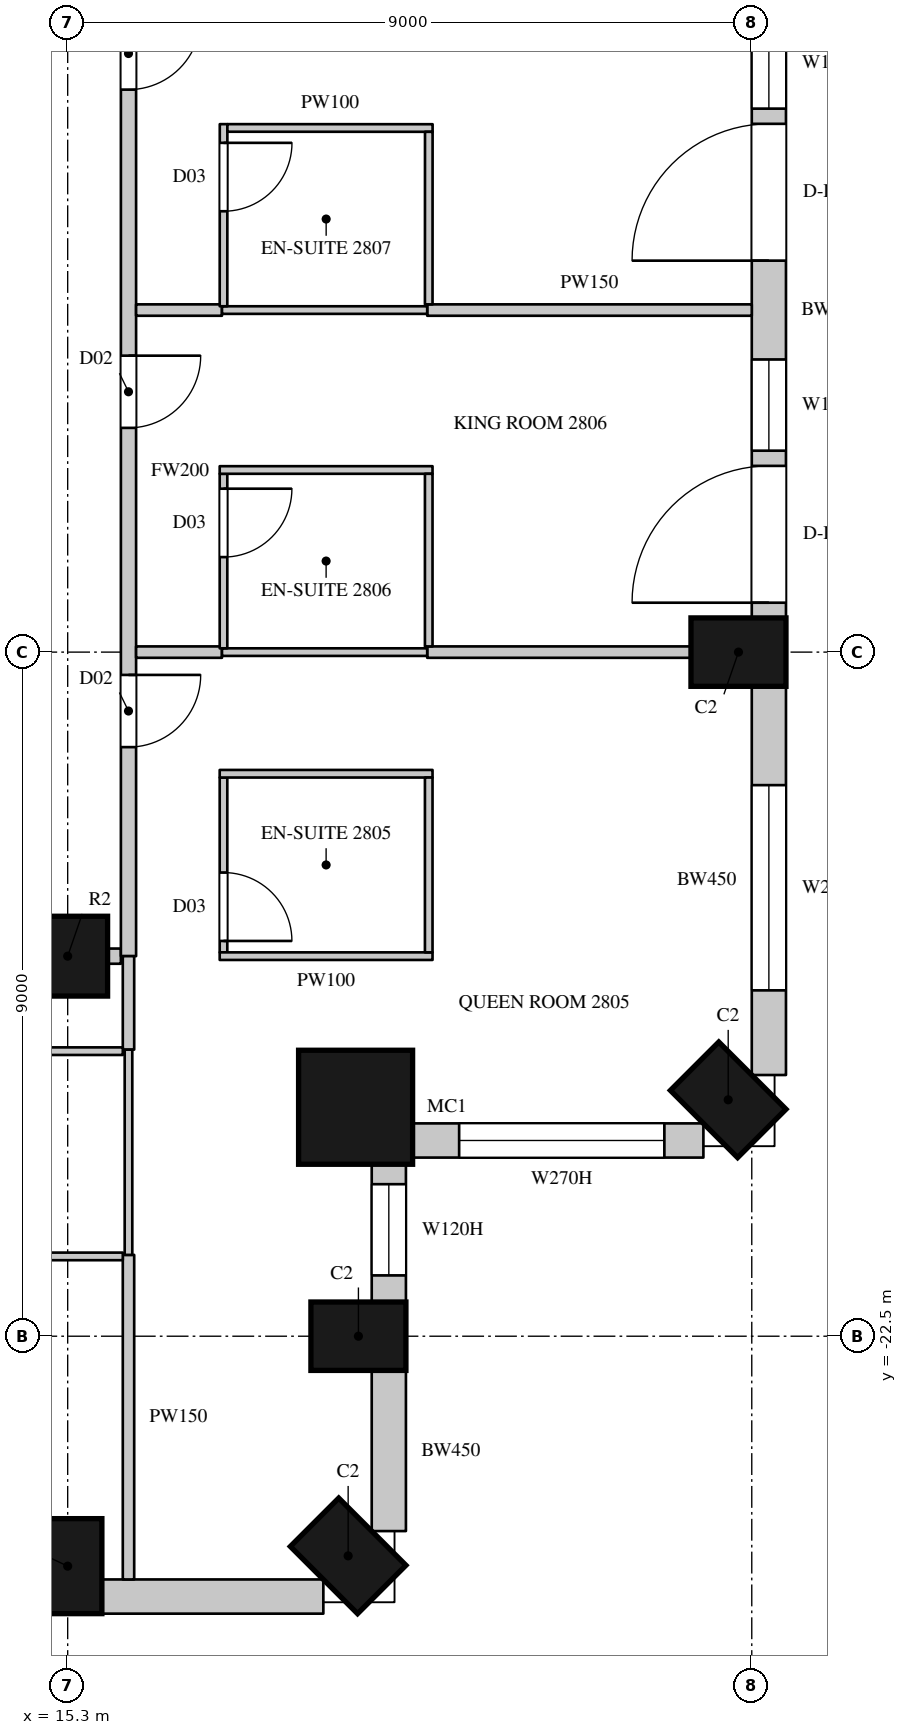
"""IFC4 building model, lengths in metres.
Left out: names, types, materials, properties, quantities, classifications, styles, units other than length and angle.
Written with IfcOpenShell. Run it as: python <this file> out.ifc"""

import sys

from ifc_helpers import new_model, si_unit, direction, frame, frame_2d, origin, origin_2d, place, context, subcontext, project, spatial, rectangle, circle, extrude, element, fill, save


model = new_model("IFC4")
c1 = context("Model", 3, precision=1e-05, world=origin(), true_north=direction((0.0, 1.0)))
c2 = subcontext(c1, "Body", "Model", "MODEL_VIEW")
j1 = project(units=[si_unit("LENGTHUNIT", "METRE"), si_unit("PLANEANGLEUNIT", "RADIAN")], contexts=[c1])
p1 = place(None, origin())
s1 = spatial("IfcSite", under=j1, at=p1, CompositionType="ELEMENT")
p2 = place(p1, origin())
s2 = spatial("IfcBuilding", under=s1, at=p2, CompositionType="ELEMENT")
p3 = place(p2, frame((0.0, 0.0, 131.1)))
s3 = spatial("IfcBuildingStorey", under=s2, at=p3, CompositionType="ELEMENT", Elevation=131.1)
for number, where, z_axis, x_axis in (
    (1, (15.3, -25.525, 0.0), (0.0, 0.0, 1.0), (1.0, 0.0, 0.0)),
    (2, (18.99, -25.39, 0.0), (0.0, 0.0, 1.0), (0.707, 0.707, 0.0)),
    (3, (19.125, -22.5, 0.0), (0.0, 0.0, 1.0), (0.0, 1.0, 0.0)),
):
    element("IfcColumn", number, at=place(p3, frame(where, z_axis=z_axis, x_axis=x_axis)), inside=s3, PredefinedType="COLUMN", context=c2, shape_type="SweptSolid", body=[
        extrude(rectangle(XDim=0.9, YDim=1.25, at=origin_2d()), origin(), (0.0, 0.0, 1.0), 3.6),
    ])
p4 = place(p3, frame((19.088, -19.488, 0.0), z_axis=(0.0, 0.0, 1.0), x_axis=(1.0, 0.0, 0.0)))
e4 = element("IfcColumn", 4, at=p4, inside=s3, PredefinedType="COLUMN", context=c2, shape_type="SweptSolid", body=[
    extrude(circle(Radius=0.75, at=origin_2d()), origin(), (0.0, 0.0, 1.0), 3.6),
])
for number, where, z_axis, x_axis in (
    (5, (23.99, -19.39, 0.0), (0.0, 0.0, 1.0), (0.707, 0.707, 0.0)),
    (6, (24.125, -13.5, 0.0), (0.0, 0.0, 1.0), (0.0, 1.0, 0.0)),
):
    element("IfcColumn", number, at=place(p3, frame(where, z_axis=z_axis, x_axis=x_axis)), inside=s3, PredefinedType="COLUMN", context=c2, shape_type="SweptSolid", body=[
        extrude(rectangle(XDim=0.9, YDim=1.25, at=origin_2d()), origin(), (0.0, 0.0, 1.0), 3.6),
    ])
p5 = place(p3, frame((15.3, -17.5, 0.0), z_axis=(0.0, 0.0, 1.0), x_axis=(1.0, 0.0, 0.0)))
e7 = element("IfcColumn", 7, at=p5, inside=s3, PredefinedType="COLUMN", context=c2, shape_type="SweptSolid", body=[
    extrude(circle(Radius=0.525, at=origin_2d()), origin(), (0.0, 0.0, 1.0), 3.6),
])
p6 = place(p3, frame((15.75, -25.925, 0.0), z_axis=(0.0, 0.0, 1.0), x_axis=(1.0, 0.0, 0.0)))
e8 = element("IfcWall", 8, at=p6, inside=s3, PredefinedType="SOLIDWALL", context=c2, shape_type="SweptSolid", body=[
    extrude(rectangle(XDim=2.914, YDim=0.45, at=frame_2d((1.457, 0.0))), origin(), (0.0, 0.0, 1.0), 3.3),
])
p7 = place(p3, frame((19.525, -25.064, 0.0), z_axis=(0.0, 0.0, 1.0), x_axis=(0.0, 1.0, 0.0)))
e9 = element("IfcWall", 9, at=p7, inside=s3, PredefinedType="SOLIDWALL", context=c2, shape_type="SweptSolid", body=[
    extrude(rectangle(XDim=2.114, YDim=0.45, at=frame_2d((1.057, 0.0))), origin(), (0.0, 0.0, 1.0), 3.3),
])
p8 = place(p3, frame((19.525, -22.05, 0.0), z_axis=(0.0, 0.0, 1.0), x_axis=(0.0, 1.0, 0.0)))
e10 = element("IfcWall", 10, at=p8, inside=s3, PredefinedType="SOLIDWALL", context=c2, shape_type="SweptSolid", body=[
    extrude(rectangle(XDim=1.843, YDim=0.45, at=frame_2d((0.921, 0.0))), origin(), (0.0, 0.0, 1.0), 3.3),
])
p9 = place(p8, frame((0.35, 0.0, 1.05)))
e11 = element("IfcOpeningElement", 11, at=p9, cuts=e10, PredefinedType="OPENING", context=c2, shape_type="SweptSolid", body=[
    extrude(rectangle(XDim=1.2, YDim=2.0, at=frame_2d((0.6, 1.0))), frame((0.0, 0.235, 0.0), z_axis=(0.0, -1.0, 0.0), x_axis=(1.0, 0.0, 0.0)), (0.0, 0.0, 1.0), 0.47),
])
p10 = place(p3, frame((19.807, -19.925, 0.0), z_axis=(0.0, 0.0, 1.0), x_axis=(1.0, 0.0, 0.0)))
e12 = element("IfcWall", 12, at=p10, inside=s3, PredefinedType="SOLIDWALL", context=c2, shape_type="SweptSolid", body=[
    extrude(rectangle(XDim=3.857, YDim=0.45, at=frame_2d((1.928, 0.0))), origin(), (0.0, 0.0, 1.0), 3.3),
])
p11 = place(p10, frame((0.643, 0.0, 1.05)))
e13 = element("IfcOpeningElement", 13, at=p11, cuts=e12, PredefinedType="OPENING", context=c2, shape_type="SweptSolid", body=[
    extrude(rectangle(XDim=2.7, YDim=2.0, at=frame_2d((1.35, 1.0))), frame((0.0, 0.235, 0.0), z_axis=(0.0, -1.0, 0.0), x_axis=(1.0, 0.0, 0.0)), (0.0, 0.0, 1.0), 0.47),
])
p12 = place(p3, frame((24.525, -19.064, 0.0), z_axis=(0.0, 0.0, 1.0), x_axis=(0.0, 1.0, 0.0)))
e14 = element("IfcWall", 14, at=p12, inside=s3, PredefinedType="SOLIDWALL", context=c2, shape_type="SweptSolid", body=[
    extrude(rectangle(XDim=5.114, YDim=0.45, at=frame_2d((2.557, 0.0))), origin(), (0.0, 0.0, 1.0), 3.3),
])
p13 = place(p12, frame((1.114, 0.0, 1.05)))
e15 = element("IfcOpeningElement", 15, at=p13, cuts=e14, PredefinedType="OPENING", context=c2, shape_type="SweptSolid", body=[
    extrude(rectangle(XDim=2.7, YDim=2.0, at=frame_2d((1.35, 1.0))), frame((0.0, 0.235, 0.0), z_axis=(0.0, -1.0, 0.0), x_axis=(1.0, 0.0, 0.0)), (0.0, 0.0, 1.0), 0.47),
])
p14 = place(p3, frame((24.525, -13.05, 0.0), z_axis=(0.0, 0.0, 1.0), x_axis=(0.0, 1.0, 0.0)))
e16 = element("IfcWall", 16, at=p14, inside=s3, PredefinedType="SOLIDWALL", context=c2, shape_type="SweptSolid", body=[
    extrude(rectangle(XDim=8.1, YDim=0.45, at=frame_2d((4.05, 0.0))), origin(), (0.0, 0.0, 1.0), 3.3),
])
p15 = place(p14, frame((0.2, 0.0, 0.0)))
e17 = element("IfcOpeningElement", 17, at=p15, cuts=e16, PredefinedType="OPENING", context=c2, shape_type="SweptSolid", body=[
    extrude(rectangle(XDim=1.8, YDim=2.4, at=frame_2d((0.9, 1.2))), frame((0.0, 0.235, 0.0), z_axis=(0.0, -1.0, 0.0), x_axis=(1.0, 0.0, 0.0)), (0.0, 0.0, 1.0), 0.47),
])
p16 = place(p14, frame((2.2, 0.0, 1.05)))
e18 = element("IfcOpeningElement", 18, at=p16, cuts=e16, PredefinedType="OPENING", context=c2, shape_type="SweptSolid", body=[
    extrude(rectangle(XDim=1.2, YDim=2.0, at=frame_2d((0.6, 1.0))), frame((0.0, 0.235, 0.0), z_axis=(0.0, -1.0, 0.0), x_axis=(1.0, 0.0, 0.0)), (0.0, 0.0, 1.0), 0.47),
])
p17 = place(p14, frame((4.7, 0.0, 0.0)))
e19 = element("IfcOpeningElement", 19, at=p17, cuts=e16, PredefinedType="OPENING", context=c2, shape_type="SweptSolid", body=[
    extrude(rectangle(XDim=1.8, YDim=2.4, at=frame_2d((0.9, 1.2))), frame((0.0, 0.235, 0.0), z_axis=(0.0, -1.0, 0.0), x_axis=(1.0, 0.0, 0.0)), (0.0, 0.0, 1.0), 0.47),
])
p18 = place(p14, frame((6.7, 0.0, 1.05)))
e20 = element("IfcOpeningElement", 20, at=p18, cuts=e16, PredefinedType="OPENING", context=c2, shape_type="SweptSolid", body=[
    extrude(rectangle(XDim=1.2, YDim=2.0, at=frame_2d((0.6, 1.0))), frame((0.0, 0.235, 0.0), z_axis=(0.0, -1.0, 0.0), x_axis=(1.0, 0.0, 0.0)), (0.0, 0.0, 1.0), 0.47),
])
p19 = place(p3, frame((15.825, -17.5, 0.0), z_axis=(0.0, 0.0, 1.0), x_axis=(1.0, 0.0, 0.0)))
e21 = element("IfcWall", 21, at=p19, inside=s3, PredefinedType="PARTITIONING", context=c2, shape_type="SweptSolid", body=[
    extrude(rectangle(XDim=0.175, YDim=0.2, at=frame_2d((0.087, 0.0))), origin(), (0.0, 0.0, 1.0), 3.3),
])
p20 = place(p3, frame((16.1, -17.5, 0.0), z_axis=(0.0, 0.0, 1.0), x_axis=(0.0, 1.0, 0.0)))
e22 = element("IfcWall", 22, at=p20, inside=s3, PredefinedType="PARTITIONING", context=c2, shape_type="SweptSolid", body=[
    extrude(rectangle(XDim=12.75, YDim=0.2, at=frame_2d((6.375, 0.0))), origin(), (0.0, 0.0, 1.0), 3.3),
])
p21 = place(p20, frame((2.75, 0.0, 0.0)))
e23 = element("IfcOpeningElement", 23, at=p21, cuts=e22, PredefinedType="OPENING", context=c2, shape_type="SweptSolid", body=[
    extrude(rectangle(XDim=0.95, YDim=2.2, at=frame_2d((0.475, 1.1))), frame((0.0, 0.11, 0.0), z_axis=(0.0, -1.0, 0.0), x_axis=(1.0, 0.0, 0.0)), (0.0, 0.0, 1.0), 0.22),
])
p22 = place(p20, frame((6.95, 0.0, 0.0)))
e24 = element("IfcOpeningElement", 24, at=p22, cuts=e22, PredefinedType="OPENING", context=c2, shape_type="SweptSolid", body=[
    extrude(rectangle(XDim=0.95, YDim=2.2, at=frame_2d((0.475, 1.1))), frame((0.0, 0.11, 0.0), z_axis=(0.0, -1.0, 0.0), x_axis=(1.0, 0.0, 0.0)), (0.0, 0.0, 1.0), 0.22),
])
p23 = place(p20, frame((11.4, 0.0, 0.0)))
e25 = element("IfcOpeningElement", 25, at=p23, cuts=e22, PredefinedType="OPENING", context=c2, shape_type="SweptSolid", body=[
    extrude(rectangle(XDim=0.95, YDim=2.2, at=frame_2d((0.475, 1.1))), frame((0.0, 0.11, 0.0), z_axis=(0.0, -1.0, 0.0), x_axis=(1.0, 0.0, 0.0)), (0.0, 0.0, 1.0), 0.22),
])
p24 = place(p3, frame((16.1, -25.7, 0.0), z_axis=(0.0, 0.0, 1.0), x_axis=(0.0, 1.0, 0.0)))
e26 = element("IfcWall", 26, at=p24, inside=s3, PredefinedType="PARTITIONING", context=c2, shape_type="SweptSolid", body=[
    extrude(rectangle(XDim=4.27, YDim=0.15, at=frame_2d((2.135, 0.0))), origin(), (0.0, 0.0, 1.0), 3.3),
])
p25 = place(p3, frame((16.1, -18.73, 0.0), z_axis=(0.0, 0.0, 1.0), x_axis=(0.0, 1.0, 0.0)))
e27 = element("IfcWall", 27, at=p25, inside=s3, PredefinedType="PARTITIONING", context=c2, shape_type="SweptSolid", body=[
    extrude(rectangle(XDim=1.23, YDim=0.15, at=frame_2d((0.615, 0.0))), origin(), (0.0, 0.0, 1.0), 3.3),
])
p26 = place(p3, frame((16.2, -13.5, 0.0), z_axis=(0.0, 0.0, 1.0), x_axis=(1.0, 0.0, 0.0)))
e28 = element("IfcWall", 28, at=p26, inside=s3, PredefinedType="PARTITIONING", context=c2, shape_type="SweptSolid", body=[
    extrude(rectangle(XDim=1.13, YDim=0.15, at=frame_2d((0.565, 0.0))), origin(), (0.0, 0.0, 1.0), 3.3),
])
p27 = place(p3, frame((16.2, -9.0, 0.0), z_axis=(0.0, 0.0, 1.0), x_axis=(1.0, 0.0, 0.0)))
e29 = element("IfcWall", 29, at=p27, inside=s3, PredefinedType="PARTITIONING", context=c2, shape_type="SweptSolid", body=[
    extrude(rectangle(XDim=1.13, YDim=0.15, at=frame_2d((0.565, 0.0))), origin(), (0.0, 0.0, 1.0), 2.65),
])
p28 = place(p3, frame((20.03, -13.5, 0.0), z_axis=(0.0, 0.0, 1.0), x_axis=(1.0, 0.0, 0.0)))
e30 = element("IfcWall", 30, at=p28, inside=s3, PredefinedType="PARTITIONING", context=c2, shape_type="SweptSolid", body=[
    extrude(rectangle(XDim=3.47, YDim=0.15, at=frame_2d((1.735, 0.0))), origin(), (0.0, 0.0, 1.0), 3.3),
])
p29 = place(p3, frame((20.03, -9.0, 0.0), z_axis=(0.0, 0.0, 1.0), x_axis=(1.0, 0.0, 0.0)))
e31 = element("IfcWall", 31, at=p29, inside=s3, PredefinedType="PARTITIONING", context=c2, shape_type="SweptSolid", body=[
    extrude(rectangle(XDim=4.27, YDim=0.15, at=frame_2d((2.135, 0.0))), origin(), (0.0, 0.0, 1.0), 2.65),
])
for number, where, z_axis, x_axis in (
    (32, (13.65, -21.45, 0.0), (0.0, 0.0, 1.0), (1.0, 0.0, 0.0)),
    (33, (13.65, -18.75, 0.0), (0.0, 0.0, 1.0), (1.0, 0.0, 0.0)),
):
    element("IfcWall", number, at=place(p3, frame(where, z_axis=z_axis, x_axis=x_axis)), inside=s3, PredefinedType="PARTITIONING", context=c2, shape_type="SweptSolid", body=[
        extrude(rectangle(XDim=2.375, YDim=0.1, at=frame_2d((1.188, 0.0))), origin(), (0.0, 0.0, 1.0), 3.3),
    ])
for number, where, z_axis, x_axis in (
    (34, (16.1, -21.43, 0.0), (0.0, 0.0, 1.0), (0.0, 1.0, 0.0)),
    (35, (17.33, -13.5, 0.0), (0.0, 0.0, 1.0), (1.0, 0.0, 0.0)),
):
    element("IfcWall", number, at=place(p3, frame(where, z_axis=z_axis, x_axis=x_axis)), inside=s3, PredefinedType="PARTITIONING", context=c2, shape_type="SweptSolid", body=[
        extrude(rectangle(XDim=2.7, YDim=0.1, at=frame_2d((1.35, 0.0))), origin(), (0.0, 0.0, 1.0), 3.3),
    ])
p30 = place(p3, frame((17.33, -9.0, 0.0), z_axis=(0.0, 0.0, 1.0), x_axis=(1.0, 0.0, 0.0)))
e36 = element("IfcWall", 36, at=p30, inside=s3, PredefinedType="PARTITIONING", context=c2, shape_type="SweptSolid", body=[
    extrude(rectangle(XDim=2.7, YDim=0.1, at=frame_2d((1.35, 0.0))), origin(), (0.0, 0.0, 1.0), 2.65),
])
p31 = place(p3, frame((17.35, -17.45, 0.0), z_axis=(0.0, 0.0, 1.0), x_axis=(0.0, 1.0, 0.0)))
e37 = element("IfcWall", 37, at=p31, inside=s3, PredefinedType="PARTITIONING", context=c2, shape_type="SweptSolid", body=[
    extrude(rectangle(XDim=2.3, YDim=0.1, at=frame_2d((1.15, 0.0))), origin(), (0.0, 0.0, 1.0), 3.3),
])
p32 = place(p31, frame((0.15, 0.0, 0.0)))
e38 = element("IfcOpeningElement", 38, at=p32, cuts=e37, PredefinedType="OPENING", context=c2, shape_type="SweptSolid", body=[
    extrude(rectangle(XDim=0.9, YDim=2.2, at=frame_2d((0.45, 1.1))), frame((0.0, 0.06, 0.0), z_axis=(0.0, -1.0, 0.0), x_axis=(1.0, 0.0, 0.0)), (0.0, 0.0, 1.0), 0.12),
])
for number, where, z_axis, x_axis in (
    (39, (17.3, -17.5, 0.0), (0.0, 0.0, 1.0), (1.0, 0.0, 0.0)),
    (40, (17.3, -15.1, 0.0), (0.0, 0.0, 1.0), (1.0, 0.0, 0.0)),
):
    element("IfcWall", number, at=place(p3, frame(where, z_axis=z_axis, x_axis=x_axis)), inside=s3, PredefinedType="PARTITIONING", context=c2, shape_type="SweptSolid", body=[
        extrude(rectangle(XDim=2.8, YDim=0.1, at=frame_2d((1.4, 0.0))), origin(), (0.0, 0.0, 1.0), 3.3),
    ])
p33 = place(p3, frame((17.35, -13.45, 0.0), z_axis=(0.0, 0.0, 1.0), x_axis=(0.0, 1.0, 0.0)))
e41 = element("IfcWall", 41, at=p33, inside=s3, PredefinedType="PARTITIONING", context=c2, shape_type="SweptSolid", body=[
    extrude(rectangle(XDim=2.296, YDim=0.1, at=frame_2d((1.148, 0.0))), origin(), (0.0, 0.0, 1.0), 3.3),
])
p34 = place(p33, frame((1.2, 0.0, 0.0)))
e42 = element("IfcOpeningElement", 42, at=p34, cuts=e41, PredefinedType="OPENING", context=c2, shape_type="SweptSolid", body=[
    extrude(rectangle(XDim=0.9, YDim=2.2, at=frame_2d((0.45, 1.1))), frame((0.0, 0.06, 0.0), z_axis=(0.0, -1.0, 0.0), x_axis=(1.0, 0.0, 0.0)), (0.0, 0.0, 1.0), 0.12),
])
p35 = place(p3, frame((17.3, -11.104, 0.0), z_axis=(0.0, 0.0, 1.0), x_axis=(1.0, 0.0, 0.0)))
e43 = element("IfcWall", 43, at=p35, inside=s3, PredefinedType="PARTITIONING", context=c2, shape_type="SweptSolid", body=[
    extrude(rectangle(XDim=2.8, YDim=0.1, at=frame_2d((1.4, 0.0))), origin(), (0.0, 0.0, 1.0), 3.3),
])
p36 = place(p3, frame((17.35, -8.95, 0.0), z_axis=(0.0, 0.0, 1.0), x_axis=(0.000407580973, 0.999999916939, 0.0)))
e44 = element("IfcWall", 44, at=p36, inside=s3, PredefinedType="PARTITIONING", context=c2, shape_type="SweptSolid", body=[
    extrude(rectangle(XDim=2.396, YDim=0.1, at=frame_2d((1.198, 0.0))), origin(), (0.0, 0.0, 1.0), 3.3),
])
p37 = place(p36, frame((1.25, 0.0, 0.0)))
e45 = element("IfcOpeningElement", 45, at=p37, cuts=e44, PredefinedType="OPENING", context=c2, shape_type="SweptSolid", body=[
    extrude(rectangle(XDim=0.9, YDim=2.2, at=frame_2d((0.45, 1.1))), frame((0.0, 0.06, 0.0), z_axis=(0.0, -1.0, 0.0), x_axis=(1.0, 0.0, 0.0)), (0.0, 0.0, 1.0), 0.12),
])
p38 = place(p3, frame((17.401, -6.604, 0.0), z_axis=(0.0, 0.0, 1.0), x_axis=(0.9999999346, -0.000361663629, 0.0)))
e46 = element("IfcWall", 46, at=p38, inside=s3, PredefinedType="PARTITIONING", context=c2, shape_type="SweptSolid", body=[
    extrude(rectangle(XDim=2.7, YDim=0.1, at=frame_2d((1.35, 0.0))), origin(), (0.0, 0.0, 1.0), 3.3),
])
p39 = place(p3, frame((20.05, -17.45, 0.0), z_axis=(0.0, 0.0, 1.0), x_axis=(0.0, 1.0, 0.0)))
e47 = element("IfcWall", 47, at=p39, inside=s3, PredefinedType="PARTITIONING", context=c2, shape_type="SweptSolid", body=[
    extrude(rectangle(XDim=2.3, YDim=0.1, at=frame_2d((1.15, 0.0))), origin(), (0.0, 0.0, 1.0), 3.3),
])
p40 = place(p3, frame((20.05, -13.425, 0.0), z_axis=(0.0, 0.0, 1.0), x_axis=(0.0, 1.0, 0.0)))
e48 = element("IfcWall", 48, at=p40, inside=s3, PredefinedType="PARTITIONING", context=c2, shape_type="SweptSolid", body=[
    extrude(rectangle(XDim=2.271, YDim=0.1, at=frame_2d((1.135, 0.0))), origin(), (0.0, 0.0, 1.0), 3.3),
])
p41 = place(p3, frame((20.05, -8.925, 0.0), z_axis=(0.0, 0.0, 1.0), x_axis=(0.000430200003, 0.999999907464, 0.0)))
e49 = element("IfcWall", 49, at=p41, inside=s3, PredefinedType="PARTITIONING", context=c2, shape_type="SweptSolid", body=[
    extrude(rectangle(XDim=2.27, YDim=0.1, at=frame_2d((1.135, 0.0))), origin(), (0.0, 0.0, 1.0), 3.3),
])
p42 = place(p9, origin())
e50 = element("IfcWindow", 50, at=p42, inside=s3, PartitioningType="SINGLE_PANEL", PredefinedType="WINDOW", context=c2, shape_type="SweptSolid", body=[
    extrude(rectangle(XDim=1.2, YDim=2.0, at=frame_2d((0.6, 1.0))), frame((0.0, 0.135, 0.0), z_axis=(0.0, -1.0, 0.0), x_axis=(1.0, 0.0, 0.0)), (0.0, 0.0, 1.0), 0.06),
])
fill(e11, e50)
p43 = place(p11, origin())
e51 = element("IfcWindow", 51, at=p43, inside=s3, PartitioningType="SINGLE_PANEL", PredefinedType="WINDOW", context=c2, shape_type="SweptSolid", body=[
    extrude(rectangle(XDim=2.7, YDim=2.0, at=frame_2d((1.35, 1.0))), frame((0.0, 0.135, 0.0), z_axis=(0.0, -1.0, 0.0), x_axis=(1.0, 0.0, 0.0)), (0.0, 0.0, 1.0), 0.06),
])
fill(e13, e51)
p44 = place(p13, origin())
e52 = element("IfcWindow", 52, at=p44, inside=s3, PartitioningType="SINGLE_PANEL", PredefinedType="WINDOW", context=c2, shape_type="SweptSolid", body=[
    extrude(rectangle(XDim=2.7, YDim=2.0, at=frame_2d((1.35, 1.0))), frame((0.0, 0.135, 0.0), z_axis=(0.0, -1.0, 0.0), x_axis=(1.0, 0.0, 0.0)), (0.0, 0.0, 1.0), 0.06),
])
fill(e15, e52)
p45 = place(p15, origin())
e53 = element("IfcDoor", 53, at=p45, inside=s3, OperationType="SLIDING_TO_LEFT", PredefinedType="DOOR", context=c2, shape_type="SweptSolid", body=[
    extrude(rectangle(XDim=1.8, YDim=2.4, at=frame_2d((0.9, 1.2))), frame((0.0, 0.13, 0.0), z_axis=(0.0, -1.0, 0.0), x_axis=(1.0, 0.0, 0.0)), (0.0, 0.0, 1.0), 0.05),
])
fill(e17, e53)
p46 = place(p16, origin())
e54 = element("IfcWindow", 54, at=p46, inside=s3, PartitioningType="SINGLE_PANEL", PredefinedType="WINDOW", context=c2, shape_type="SweptSolid", body=[
    extrude(rectangle(XDim=1.2, YDim=2.0, at=frame_2d((0.6, 1.0))), frame((0.0, 0.135, 0.0), z_axis=(0.0, -1.0, 0.0), x_axis=(1.0, 0.0, 0.0)), (0.0, 0.0, 1.0), 0.06),
])
fill(e18, e54)
p47 = place(p17, origin())
e55 = element("IfcDoor", 55, at=p47, inside=s3, OperationType="SLIDING_TO_LEFT", PredefinedType="DOOR", context=c2, shape_type="SweptSolid", body=[
    extrude(rectangle(XDim=1.8, YDim=2.4, at=frame_2d((0.9, 1.2))), frame((0.0, 0.13, 0.0), z_axis=(0.0, -1.0, 0.0), x_axis=(1.0, 0.0, 0.0)), (0.0, 0.0, 1.0), 0.05),
])
fill(e19, e55)
p48 = place(p18, origin())
e56 = element("IfcWindow", 56, at=p48, inside=s3, PartitioningType="SINGLE_PANEL", PredefinedType="WINDOW", context=c2, shape_type="SweptSolid", body=[
    extrude(rectangle(XDim=1.2, YDim=2.0, at=frame_2d((0.6, 1.0))), frame((0.0, 0.135, 0.0), z_axis=(0.0, -1.0, 0.0), x_axis=(1.0, 0.0, 0.0)), (0.0, 0.0, 1.0), 0.06),
])
fill(e20, e56)
p49 = place(p21, origin())
e57 = element("IfcDoor", 57, at=p49, inside=s3, OperationType="SINGLE_SWING_LEFT", PredefinedType="DOOR", context=c2, shape_type="SweptSolid", body=[
    extrude(rectangle(XDim=0.95, YDim=2.2, at=frame_2d((0.475, 1.1))), frame((0.0, 0.025, 0.0), z_axis=(0.0, -1.0, 0.0), x_axis=(1.0, 0.0, 0.0)), (0.0, 0.0, 1.0), 0.05),
])
fill(e23, e57)
p50 = place(p32, origin())
e58 = element("IfcDoor", 58, at=p50, inside=s3, OperationType="SINGLE_SWING_RIGHT", PredefinedType="DOOR", context=c2, shape_type="SweptSolid", body=[
    extrude(rectangle(XDim=0.9, YDim=2.2, at=frame_2d((0.45, 1.1))), frame((0.0, 0.025, 0.0), z_axis=(0.0, -1.0, 0.0), x_axis=(1.0, 0.0, 0.0)), (0.0, 0.0, 1.0), 0.05),
])
fill(e38, e58)
p51 = place(p22, origin())
e59 = element("IfcDoor", 59, at=p51, inside=s3, OperationType="SINGLE_SWING_LEFT", PredefinedType="DOOR", context=c2, shape_type="SweptSolid", body=[
    extrude(rectangle(XDim=0.95, YDim=2.2, at=frame_2d((0.475, 1.1))), frame((0.0, 0.025, 0.0), z_axis=(0.0, -1.0, 0.0), x_axis=(1.0, 0.0, 0.0)), (0.0, 0.0, 1.0), 0.05),
])
fill(e24, e59)
p52 = place(p34, origin())
e60 = element("IfcDoor", 60, at=p52, inside=s3, OperationType="SINGLE_SWING_LEFT", PredefinedType="DOOR", context=c2, shape_type="SweptSolid", body=[
    extrude(rectangle(XDim=0.9, YDim=2.2, at=frame_2d((0.45, 1.1))), frame((0.0, 0.025, 0.0), z_axis=(0.0, -1.0, 0.0), x_axis=(1.0, 0.0, 0.0)), (0.0, 0.0, 1.0), 0.05),
])
fill(e42, e60)
p53 = place(p23, origin())
e61 = element("IfcDoor", 61, at=p53, inside=s3, OperationType="SINGLE_SWING_LEFT", PredefinedType="DOOR", context=c2, shape_type="SweptSolid", body=[
    extrude(rectangle(XDim=0.95, YDim=2.2, at=frame_2d((0.475, 1.1))), frame((0.0, 0.025, 0.0), z_axis=(0.0, -1.0, 0.0), x_axis=(1.0, 0.0, 0.0)), (0.0, 0.0, 1.0), 0.05),
])
fill(e25, e61)
p54 = place(p37, origin())
e62 = element("IfcDoor", 62, at=p54, inside=s3, OperationType="SINGLE_SWING_LEFT", PredefinedType="DOOR", context=c2, shape_type="SweptSolid", body=[
    extrude(rectangle(XDim=0.9, YDim=2.2, at=frame_2d((0.45, 1.1))), frame((0.0, 0.025, 0.0), z_axis=(0.0, -1.0, 0.0), x_axis=(1.0, 0.0, 0.0)), (0.0, 0.0, 1.0), 0.05),
])
fill(e45, e62)
save(model, sys.argv[1])
